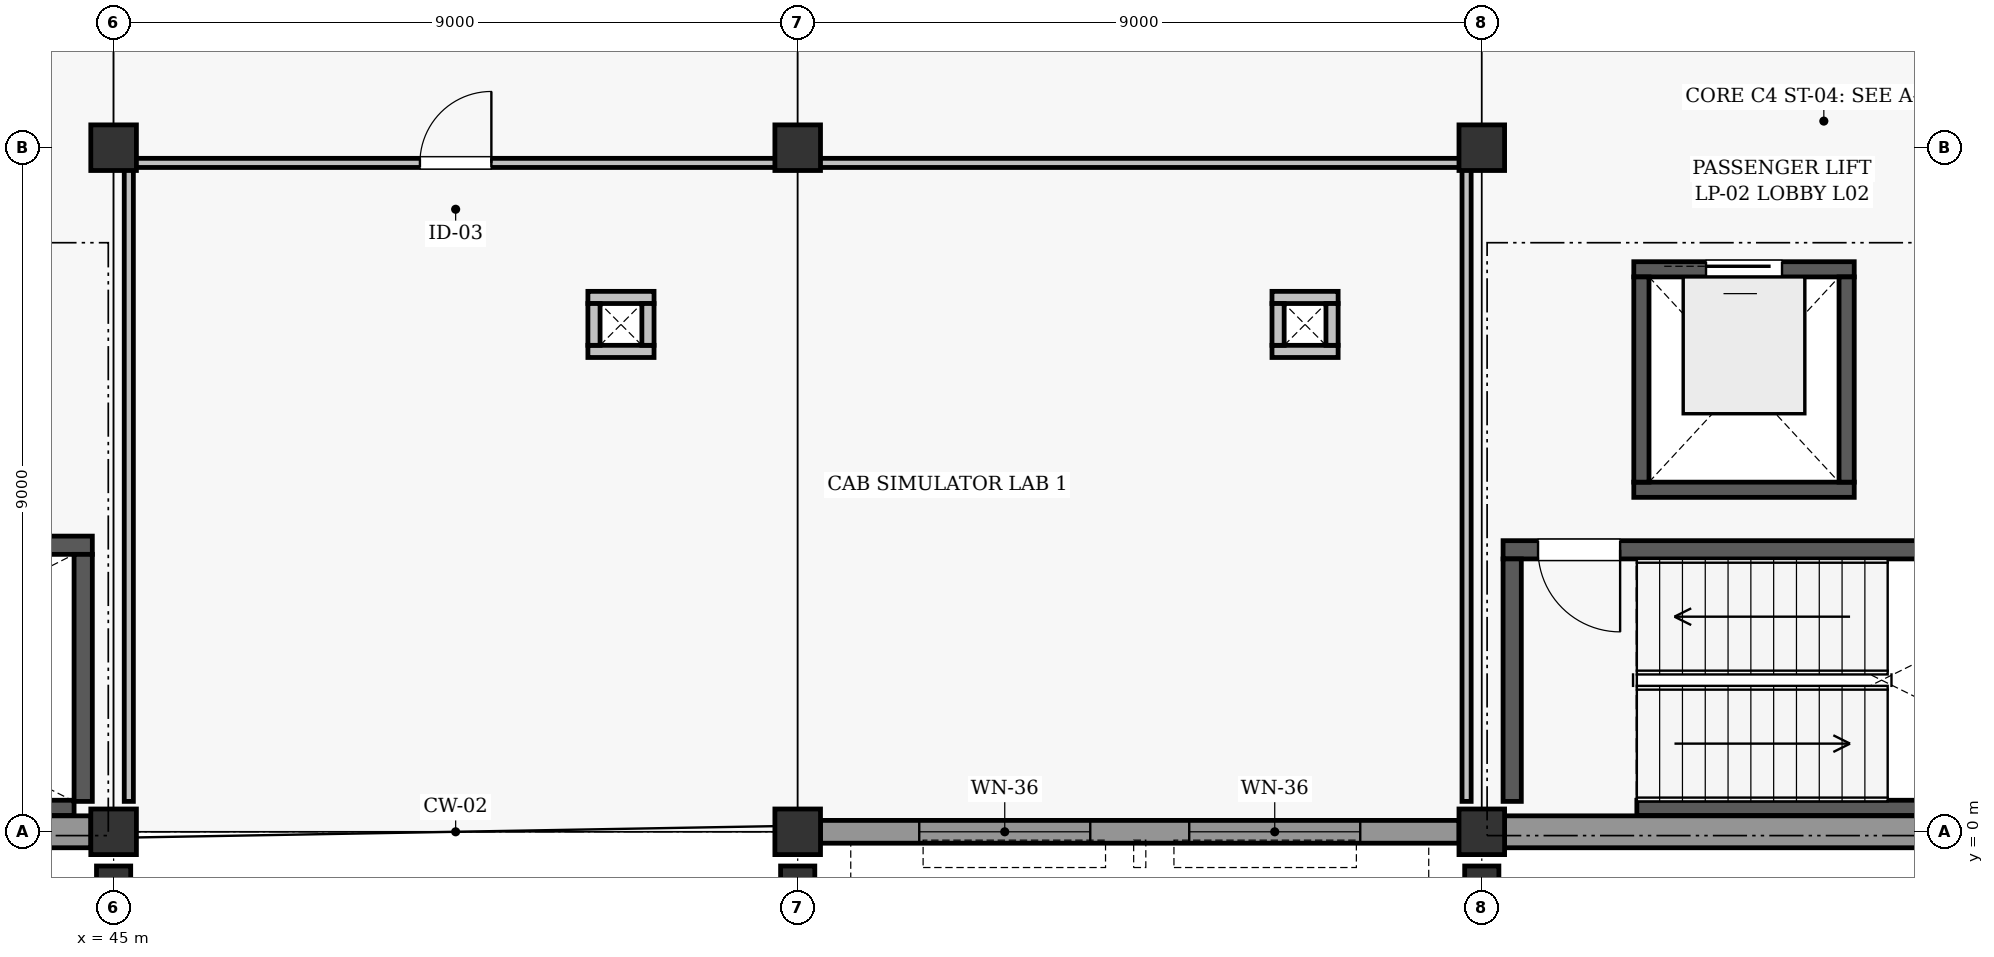
"""IFC4 building model, lengths in metres.
Left out: names, types, materials, properties, quantities, classifications, styles, units other than length and angle.
Written with IfcOpenShell. Run it as: python <this file> out.ifc"""

import sys

from ifc_helpers import new_model, si_unit, direction, frame, frame_2d, origin, origin_2d, place, context, subcontext, project, spatial, rectangle, extrude, element, fill, save


model = new_model("IFC4")
c1 = context("Model", 3, precision=1e-05, world=origin(), true_north=direction((0.0, 1.0)))
c2 = subcontext(c1, "Body", "Model", "MODEL_VIEW")
j1 = project(units=[si_unit("LENGTHUNIT", "METRE"), si_unit("PLANEANGLEUNIT", "RADIAN")], contexts=[c1])
p1 = place(None, origin())
s1 = spatial("IfcSite", under=j1, at=p1, CompositionType="ELEMENT")
p2 = place(p1, origin())
s2 = spatial("IfcBuilding", under=s1, at=p2, CompositionType="ELEMENT")
p3 = place(p2, frame((0.0, 0.0, 8.4)))
s3 = spatial("IfcBuildingStorey", under=s2, at=p3, CompositionType="ELEMENT", Elevation=8.4)
for number, where, z_axis, x_axis in (
    (1, (45.0, 0.0, 0.0), (0.0, 0.0, 1.0), (1.0, 0.0, 0.0)),
    (2, (45.0, 9.0, 0.0), (0.0, 0.0, 1.0), (1.0, 0.0, 0.0)),
    (3, (54.0, 0.0, 0.0), (0.0, 0.0, 1.0), (1.0, 0.0, 0.0)),
    (4, (54.0, 9.0, 0.0), (0.0, 0.0, 1.0), (1.0, 0.0, 0.0)),
    (5, (63.0, 0.0, 0.0), (0.0, 0.0, 1.0), (1.0, 0.0, 0.0)),
    (6, (63.0, 9.0, 0.0), (0.0, 0.0, 1.0), (1.0, 0.0, 0.0)),
):
    element("IfcColumn", number, at=place(p3, frame(where, z_axis=z_axis, x_axis=x_axis)), inside=s3, PredefinedType="COLUMN", context=c2, shape_type="SweptSolid", body=[
        extrude(rectangle(XDim=0.6, YDim=0.6, at=origin_2d()), origin(), (0.0, 0.0, 1.0), 3.6),
    ])
for number, where, z_axis, x_axis in (
    (7, (45.0, -0.75, 0.0), (0.0, 0.0, 1.0), (1.0, 0.0, 0.0)),
    (8, (54.0, -0.75, 0.0), (0.0, 0.0, 1.0), (1.0, 0.0, 0.0)),
    (9, (63.0, -0.75, 0.0), (0.0, 0.0, 1.0), (1.0, 0.0, 0.0)),
):
    element("IfcColumn", number, at=place(p3, frame(where, z_axis=z_axis, x_axis=x_axis)), inside=s3, PredefinedType="PILASTER", context=c2, shape_type="SweptSolid", body=[
        extrude(rectangle(XDim=0.45, YDim=0.6, at=origin_2d()), origin(), (0.0, 0.0, 1.0), 3.6),
    ])
p4 = place(p3, frame((36.298, 0.0, 0.0), z_axis=(0.0, 0.0, 1.0), x_axis=(1.0, 0.0, 0.0)))
e10 = element("IfcWall", 10, at=p4, inside=s3, PredefinedType="SOLIDWALL", context=c2, shape_type="SweptSolid", body=[
    extrude(rectangle(XDim=8.404, YDim=0.42, at=frame_2d((4.202, 0.0))), origin(), (0.0, 0.0, 1.0), 2.862),
])
p5 = place(p3, frame((54.298, 0.0, 0.0), z_axis=(0.0, 0.0, 1.0), x_axis=(1.0, 0.0, 0.0)))
e11 = element("IfcWall", 11, at=p5, inside=s3, PredefinedType="SOLIDWALL", context=c2, shape_type="SweptSolid", body=[
    extrude(rectangle(XDim=8.404, YDim=0.3, at=frame_2d((4.202, 0.0))), origin(), (0.0, 0.0, 1.0), 2.862),
])
p6 = place(p5, frame((1.301, 0.0, 0.5)))
e12 = element("IfcOpeningElement", 12, at=p6, cuts=e11, PredefinedType="OPENING", context=c2, shape_type="SweptSolid", body=[
    extrude(rectangle(XDim=2.25, YDim=2.18, at=frame_2d((1.125, 1.09))), frame((0.0, 0.16, 0.0), z_axis=(0.0, -1.0, 0.0), x_axis=(1.0, 0.0, 0.0)), (0.0, 0.0, 1.0), 0.32),
])
p7 = place(p5, frame((4.853, 0.0, 0.5)))
e13 = element("IfcOpeningElement", 13, at=p7, cuts=e11, PredefinedType="OPENING", context=c2, shape_type="SweptSolid", body=[
    extrude(rectangle(XDim=2.25, YDim=2.18, at=frame_2d((1.125, 1.09))), frame((0.0, 0.16, 0.0), z_axis=(0.0, -1.0, 0.0), x_axis=(1.0, 0.0, 0.0)), (0.0, 0.0, 1.0), 0.32),
])
p8 = place(p3, frame((63.298, 0.0, 0.0), z_axis=(0.0, 0.0, 1.0), x_axis=(1.0, 0.0, 0.0)))
e14 = element("IfcWall", 14, at=p8, inside=s3, PredefinedType="SOLIDWALL", context=c2, shape_type="SweptSolid", body=[
    extrude(rectangle(XDim=8.404, YDim=0.42, at=frame_2d((4.202, 0.0))), origin(), (0.0, 0.0, 1.0), 2.862),
])
p9 = place(p3, frame((38.07, 0.315, 0.0), z_axis=(0.0, 0.0, 1.0), x_axis=(1.0, 0.0, 0.0)))
e15 = element("IfcWall", 15, at=p9, inside=s3, PredefinedType="SHEAR", context=c2, shape_type="SweptSolid", body=[
    extrude(rectangle(XDim=6.41, YDim=0.2, at=frame_2d((3.205, 0.0))), origin(), (0.0, 0.0, 1.0), 3.35),
])
p10 = place(p3, frame((36.28, 3.77, 0.0), z_axis=(0.0, 0.0, 1.0), x_axis=(1.0, 0.0, 0.0)))
e16 = element("IfcWall", 16, at=p10, inside=s3, PredefinedType="SHEAR", context=c2, shape_type="SweptSolid", body=[
    extrude(rectangle(XDim=8.44, YDim=0.24, at=frame_2d((4.22, 0.0))), origin(), (0.0, 0.0, 1.0), 3.35),
])
p11 = place(p10, frame((0.48, 0.0, 0.0)))
e17 = element("IfcOpeningElement", 17, at=p11, cuts=e16, PredefinedType="OPENING", context=c2, shape_type="SweptSolid", body=[
    extrude(rectangle(XDim=1.08, YDim=2.08, at=frame_2d((0.54, 1.04))), frame((0.0, 0.13, 0.0), z_axis=(0.0, -1.0, 0.0), x_axis=(1.0, 0.0, 0.0)), (0.0, 0.0, 1.0), 0.26),
])
p12 = place(p3, frame((44.6, 0.4, 0.0), z_axis=(0.0, 0.0, 1.0), x_axis=(0.0, 1.0, 0.0)))
e18 = element("IfcWall", 18, at=p12, inside=s3, PredefinedType="SHEAR", context=c2, shape_type="SweptSolid", body=[
    extrude(rectangle(XDim=3.25, YDim=0.24, at=frame_2d((1.625, 0.0))), origin(), (0.0, 0.0, 1.0), 3.35),
])
p13 = place(p3, frame((65.04, 0.315, 0.0), z_axis=(0.0, 0.0, 1.0), x_axis=(1.0, 0.0, 0.0)))
e19 = element("IfcWall", 19, at=p13, inside=s3, PredefinedType="SHEAR", context=c2, shape_type="SweptSolid", body=[
    extrude(rectangle(XDim=6.44, YDim=0.2, at=frame_2d((3.22, 0.0))), origin(), (0.0, 0.0, 1.0), 3.35),
])
p14 = place(p3, frame((63.28, 3.71, 0.0), z_axis=(0.0, 0.0, 1.0), x_axis=(1.0, 0.0, 0.0)))
e20 = element("IfcWall", 20, at=p14, inside=s3, PredefinedType="SHEAR", context=c2, shape_type="SweptSolid", body=[
    extrude(rectangle(XDim=8.44, YDim=0.24, at=frame_2d((4.22, 0.0))), origin(), (0.0, 0.0, 1.0), 3.35),
])
p15 = place(p14, frame((0.46, 0.0, 0.0)))
e21 = element("IfcOpeningElement", 21, at=p15, cuts=e20, PredefinedType="OPENING", context=c2, shape_type="SweptSolid", body=[
    extrude(rectangle(XDim=1.08, YDim=2.08, at=frame_2d((0.54, 1.04))), frame((0.0, 0.13, 0.0), z_axis=(0.0, -1.0, 0.0), x_axis=(1.0, 0.0, 0.0)), (0.0, 0.0, 1.0), 0.26),
])
p16 = place(p3, frame((63.4, 0.4, 0.0), z_axis=(0.0, 0.0, 1.0), x_axis=(0.0, 1.0, 0.0)))
e22 = element("IfcWall", 22, at=p16, inside=s3, PredefinedType="SHEAR", context=c2, shape_type="SweptSolid", body=[
    extrude(rectangle(XDim=3.19, YDim=0.24, at=frame_2d((1.595, 0.0))), origin(), (0.0, 0.0, 1.0), 3.35),
])
p17 = place(p3, frame((65.0, 4.5, 0.0), z_axis=(0.0, 0.0, 1.0), x_axis=(1.0, 0.0, 0.0)))
e23 = element("IfcWall", 23, at=p17, inside=s3, PredefinedType="SHEAR", context=c2, shape_type="SweptSolid", body=[
    extrude(rectangle(XDim=2.9, YDim=0.2, at=frame_2d((1.45, 0.0))), origin(), (0.0, 0.0, 1.0), 3.35),
])
p18 = place(p3, frame((65.0, 7.4, 0.0), z_axis=(0.0, 0.0, 1.0), x_axis=(1.0, 0.0, 0.0)))
e24 = element("IfcWall", 24, at=p18, inside=s3, PredefinedType="SHEAR", context=c2, shape_type="SweptSolid", body=[
    extrude(rectangle(XDim=2.9, YDim=0.2, at=frame_2d((1.45, 0.0))), origin(), (0.0, 0.0, 1.0), 3.35),
])
p19 = place(p18, frame((0.95, 0.0, 0.0)))
e25 = element("IfcOpeningElement", 25, at=p19, cuts=e24, PredefinedType="OPENING", context=c2, shape_type="SweptSolid", body=[
    extrude(rectangle(XDim=1.0, YDim=2.1, at=frame_2d((0.5, 1.05))), frame((0.0, 0.11, 0.0), z_axis=(0.0, -1.0, 0.0), x_axis=(1.0, 0.0, 0.0)), (0.0, 0.0, 1.0), 0.22),
])
for number, where, z_axis, x_axis in (
    (26, (65.1, 4.6, 0.0), (0.0, 0.0, 1.0), (0.0, 1.0, 0.0)),
    (27, (67.8, 4.6, 0.0), (0.0, 0.0, 1.0), (0.0, 1.0, 0.0)),
):
    element("IfcWall", number, at=place(p3, frame(where, z_axis=z_axis, x_axis=x_axis)), inside=s3, PredefinedType="SHEAR", context=c2, shape_type="SweptSolid", body=[
        extrude(rectangle(XDim=2.7, YDim=0.2, at=frame_2d((1.35, 0.0))), origin(), (0.0, 0.0, 1.0), 3.35),
    ])
for number, where, z_axis, x_axis in (
    (28, (51.24, 6.32, 0.0), (0.0, 0.0, 1.0), (1.0, 0.0, 0.0)),
    (29, (51.24, 7.03, 0.0), (0.0, 0.0, 1.0), (1.0, 0.0, 0.0)),
):
    element("IfcWall", number, at=place(p3, frame(where, z_axis=z_axis, x_axis=x_axis)), inside=s3, PredefinedType="PARTITIONING", context=c2, shape_type="SweptSolid", body=[
        extrude(rectangle(XDim=0.87, YDim=0.16, at=frame_2d((0.435, 0.0))), origin(), (0.0, 0.0, 1.0), 3.35),
    ])
for number, where, z_axis, x_axis in (
    (30, (51.32, 6.4, 0.0), (0.0, 0.0, 1.0), (0.0, 1.0, 0.0)),
    (31, (52.03, 6.4, 0.0), (0.0, 0.0, 1.0), (0.0, 1.0, 0.0)),
):
    element("IfcWall", number, at=place(p3, frame(where, z_axis=z_axis, x_axis=x_axis)), inside=s3, PredefinedType="PARTITIONING", context=c2, shape_type="SweptSolid", body=[
        extrude(rectangle(XDim=0.55, YDim=0.16, at=frame_2d((0.275, 0.0))), origin(), (0.0, 0.0, 1.0), 3.35),
    ])
for number, where, z_axis, x_axis in (
    (32, (60.24, 6.32, 0.0), (0.0, 0.0, 1.0), (1.0, 0.0, 0.0)),
    (33, (60.24, 7.03, 0.0), (0.0, 0.0, 1.0), (1.0, 0.0, 0.0)),
):
    element("IfcWall", number, at=place(p3, frame(where, z_axis=z_axis, x_axis=x_axis)), inside=s3, PredefinedType="PARTITIONING", context=c2, shape_type="SweptSolid", body=[
        extrude(rectangle(XDim=0.87, YDim=0.16, at=frame_2d((0.435, 0.0))), origin(), (0.0, 0.0, 1.0), 3.35),
    ])
for number, where, z_axis, x_axis in (
    (34, (60.32, 6.4, 0.0), (0.0, 0.0, 1.0), (0.0, 1.0, 0.0)),
    (35, (61.03, 6.4, 0.0), (0.0, 0.0, 1.0), (0.0, 1.0, 0.0)),
):
    element("IfcWall", number, at=place(p3, frame(where, z_axis=z_axis, x_axis=x_axis)), inside=s3, PredefinedType="PARTITIONING", context=c2, shape_type="SweptSolid", body=[
        extrude(rectangle(XDim=0.55, YDim=0.16, at=frame_2d((0.275, 0.0))), origin(), (0.0, 0.0, 1.0), 3.35),
    ])
p20 = place(p3, frame((45.2, 8.8, 0.0), z_axis=(0.0, 0.0, 1.0), x_axis=(1.0, 0.0, 0.0)))
e36 = element("IfcWall", 36, at=p20, inside=s3, PredefinedType="PARTITIONING", context=c2, shape_type="SweptSolid", body=[
    extrude(rectangle(XDim=17.6, YDim=0.12, at=frame_2d((8.8, 0.0))), origin(), (0.0, 0.0, 1.0), 2.845),
])
p21 = place(p20, frame((3.83, 0.0, 0.0)))
e37 = element("IfcOpeningElement", 37, at=p21, cuts=e36, PredefinedType="OPENING", context=c2, shape_type="SweptSolid", body=[
    extrude(rectangle(XDim=0.94, YDim=2.06, at=frame_2d((0.47, 1.03))), frame((0.0, 0.07, 0.0), z_axis=(0.0, -1.0, 0.0), x_axis=(1.0, 0.0, 0.0)), (0.0, 0.0, 1.0), 0.14),
])
for number, where, z_axis, x_axis in (
    (38, (45.2, 0.4, 0.0), (0.0, 0.0, 1.0), (0.0, 1.0, 0.0)),
    (39, (62.8, 0.4, 0.0), (0.0, 0.0, 1.0), (0.0, 1.0, 0.0)),
):
    element("IfcWall", number, at=place(p3, frame(where, z_axis=z_axis, x_axis=x_axis)), inside=s3, PredefinedType="PARTITIONING", context=c2, shape_type="SweptSolid", body=[
        extrude(rectangle(XDim=8.4, YDim=0.12, at=frame_2d((4.2, 0.0))), origin(), (0.0, 0.0, 1.0), 2.845),
    ])
p22 = place(p6, origin())
e40 = element("IfcWindow", 40, at=p22, inside=s3, PartitioningType="SINGLE_PANEL", PredefinedType="WINDOW", context=c2, shape_type="SweptSolid", body=[
    extrude(rectangle(XDim=2.25, YDim=2.18, at=frame_2d((1.125, 1.09))), frame((0.0, 0.03, 0.0), z_axis=(0.0, -1.0, 0.0), x_axis=(1.0, 0.0, 0.0)), (0.0, 0.0, 1.0), 0.06),
])
fill(e12, e40)
p23 = place(p7, origin())
e41 = element("IfcWindow", 41, at=p23, inside=s3, PartitioningType="SINGLE_PANEL", PredefinedType="WINDOW", context=c2, shape_type="SweptSolid", body=[
    extrude(rectangle(XDim=2.25, YDim=2.18, at=frame_2d((1.125, 1.09))), frame((0.0, 0.03, 0.0), z_axis=(0.0, -1.0, 0.0), x_axis=(1.0, 0.0, 0.0)), (0.0, 0.0, 1.0), 0.06),
])
fill(e13, e41)
p24 = place(p15, frame((1.08, 0.0, 0.0), z_axis=(0.0, 0.0, 1.0), x_axis=(-1.0, 0.0, 0.0)))
e42 = element("IfcDoor", 42, at=p24, inside=s3, OperationType="SINGLE_SWING_RIGHT", PredefinedType="DOOR", context=c2, shape_type="SweptSolid", body=[
    extrude(rectangle(XDim=1.08, YDim=2.08, at=frame_2d((0.54, 1.04))), frame((0.0, 0.025, 0.0), z_axis=(0.0, -1.0, 0.0), x_axis=(1.0, 0.0, 0.0)), (0.0, 0.0, 1.0), 0.05),
])
fill(e21, e42)
p25 = place(p19, origin())
e43 = element("IfcDoor", 43, at=p25, inside=s3, OperationType="SLIDING_TO_LEFT", PredefinedType="DOOR", context=c2, shape_type="SweptSolid", body=[
    extrude(rectangle(XDim=1.0, YDim=2.1, at=frame_2d((0.5, 1.05))), frame((0.0, 0.025, 0.0), z_axis=(0.0, -1.0, 0.0), x_axis=(1.0, 0.0, 0.0)), (0.0, 0.0, 1.0), 0.05),
])
fill(e25, e43)
p26 = place(p21, origin())
e44 = element("IfcDoor", 44, at=p26, inside=s3, OperationType="SINGLE_SWING_RIGHT", PredefinedType="DOOR", context=c2, shape_type="SweptSolid", body=[
    extrude(rectangle(XDim=0.94, YDim=2.06, at=frame_2d((0.47, 1.03))), frame((0.0, 0.025, 0.0), z_axis=(0.0, -1.0, 0.0), x_axis=(1.0, 0.0, 0.0)), (0.0, 0.0, 1.0), 0.05),
])
fill(e37, e44)
save(model, sys.argv[1])
